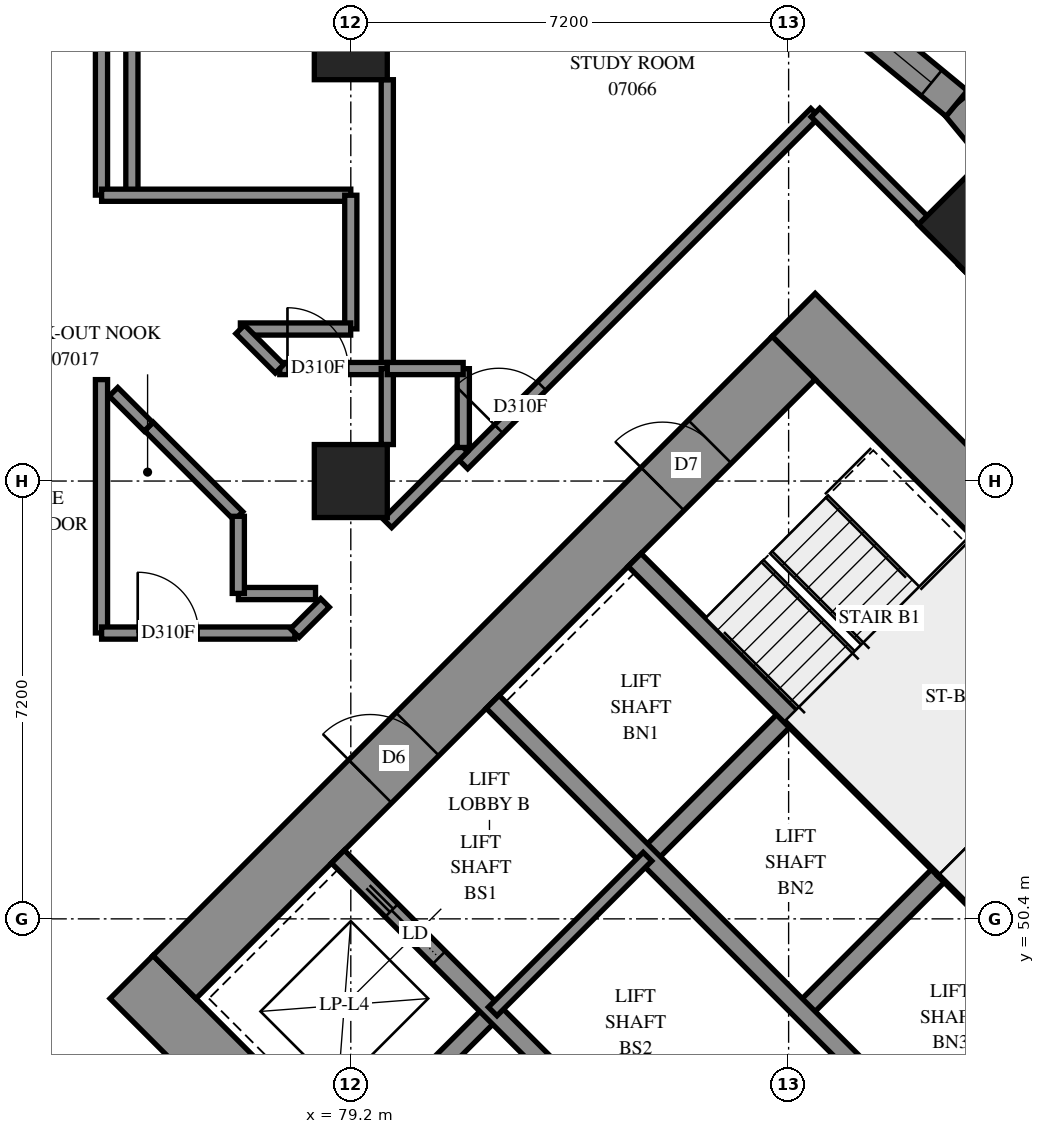
"""IFC4 building model, lengths in metres.
Left out: names, types, materials, properties, quantities, classifications, styles, units other than length and angle.
Written with IfcOpenShell. Run it as: python <this file> out.ifc"""

import sys

from ifc_helpers import new_model, si_unit, direction, frame, frame_2d, origin, origin_2d, place, context, subcontext, project, spatial, polyline, rectangle, outline, extrude, element, fill, save


model = new_model("IFC4")
c1 = context("Model", 3, precision=1e-05, world=origin(), true_north=direction((0.0, 1.0)))
c2 = subcontext(c1, "Body", "Model", "MODEL_VIEW")
j1 = project(units=[si_unit("LENGTHUNIT", "METRE"), si_unit("PLANEANGLEUNIT", "RADIAN")], contexts=[c1])
p1 = place(None, origin())
s1 = spatial("IfcSite", under=j1, at=p1, CompositionType="ELEMENT")
p2 = place(p1, origin())
s2 = spatial("IfcBuilding", under=s1, at=p2, CompositionType="ELEMENT")
p3 = place(p2, frame((0.0, 0.0, 30.4)))
s3 = spatial("IfcBuildingStorey", under=s2, at=p3, CompositionType="ELEMENT", Elevation=30.4)
for number, where, z_axis, x_axis in (
    (1, (79.2, 57.6, 0.0), (0.0, 0.0, 1.0), (1.0, 0.0, 0.0)),
    (2, (79.2, 64.8, 0.0), (0.0, 0.0, 1.0), (1.0, 0.0, 0.0)),
    (3, (89.382, 61.818, 0.0), (0.0, 0.0, 1.0), (0.707, -0.707, 0.0)),
):
    element("IfcColumn", number, at=place(p3, frame(where, z_axis=z_axis, x_axis=x_axis)), inside=s3, PredefinedType="COLUMN", context=c2, shape_type="SweptSolid", body=[
        extrude(rectangle(XDim=1.2, YDim=1.2, at=origin_2d()), origin(), (0.0, 0.0, 1.0), 3.1),
    ])
p4 = place(p3, frame((75.594, 49.443, -0.3), z_axis=(0.0, 0.0, 1.0), x_axis=(0.7071037324, -0.70710983, 0.0)))
e4 = element("IfcWall", 4, at=p4, inside=s3, PredefinedType="SHEAR", context=c2, shape_type="SweptSolid", body=[
    extrude(rectangle(XDim=16.4, YDim=1.0, at=frame_2d((8.2, 0.0))), origin(), (0.0, 0.0, 1.0), 2.7),
])
p5 = place(p3, frame((86.483, 60.333, -0.3), z_axis=(0.0, 0.0, 1.0), x_axis=(0.70710983, -0.7071037324, 0.0)))
e5 = element("IfcWall", 5, at=p5, inside=s3, PredefinedType="SHEAR", context=c2, shape_type="SweptSolid", body=[
    extrude(rectangle(XDim=16.4, YDim=1.0, at=frame_2d((8.2, 0.0))), origin(), (0.0, 0.0, 1.0), 2.7),
])
p6 = place(p5, frame((11.0, 0.0, 0.3)))
e6 = element("IfcOpeningElement", 6, at=p6, cuts=e5, PredefinedType="OPENING", context=c2, shape_type="SweptSolid", body=[
    extrude(rectangle(XDim=0.8, YDim=2.1, at=frame_2d((0.4, 1.05))), frame((0.0, 0.51, 0.0), z_axis=(0.0, -1.0, 0.0), x_axis=(1.0, 0.0, 0.0)), (0.0, 0.0, 1.0), 1.02),
])
p7 = place(p3, frame((76.301, 49.443, -0.3), z_axis=(0.0, 0.0, 1.0), x_axis=(0.7071067812, 0.7071067812, 0.0)))
e7 = element("IfcWall", 7, at=p7, inside=s3, PredefinedType="SHEAR", context=c2, shape_type="SweptSolid", body=[
    extrude(rectangle(XDim=14.4, YDim=1.0, at=frame_2d((7.2, 0.0))), origin(), (0.0, 0.0, 1.0), 2.7),
])
p8 = place(p7, frame((4.55, 0.0, 0.3)))
e8 = element("IfcOpeningElement", 8, at=p8, cuts=e7, PredefinedType="OPENING", context=c2, shape_type="SweptSolid", body=[
    extrude(rectangle(XDim=1.1, YDim=2.1, at=frame_2d((0.55, 1.05))), frame((0.0, 0.51, 0.0), z_axis=(0.0, -1.0, 0.0), x_axis=(1.0, 0.0, 0.0)), (0.0, 0.0, 1.0), 1.02),
])
p9 = place(p7, frame((11.35, 0.0, 0.3)))
e9 = element("IfcOpeningElement", 9, at=p9, cuts=e7, PredefinedType="OPENING", context=c2, shape_type="SweptSolid", body=[
    extrude(rectangle(XDim=1.1, YDim=2.1, at=frame_2d((0.55, 1.05))), frame((0.0, 0.51, 0.0), z_axis=(0.0, -1.0, 0.0), x_axis=(1.0, 0.0, 0.0)), (0.0, 0.0, 1.0), 1.02),
])
p10 = place(p3, frame((87.19, 38.554, -0.3), z_axis=(0.0, 0.0, 1.0), x_axis=(0.707103309, 0.7071102534, 0.0)))
e10 = element("IfcWall", 10, at=p10, inside=s3, PredefinedType="SHEAR", context=c2, shape_type="SweptSolid", body=[
    extrude(rectangle(XDim=14.4, YDim=1.0, at=frame_2d((7.2, 0.0))), origin(), (0.0, 0.0, 1.0), 2.7),
])
p11 = place(p10, frame((4.55, 0.0, 0.3)))
e11 = element("IfcOpeningElement", 11, at=p11, cuts=e10, PredefinedType="OPENING", context=c2, shape_type="SweptSolid", body=[
    extrude(rectangle(XDim=1.1, YDim=2.1, at=frame_2d((0.55, 1.05))), frame((0.0, 0.51, 0.0), z_axis=(0.0, -1.0, 0.0), x_axis=(1.0, 0.0, 0.0)), (0.0, 0.0, 1.0), 1.02),
])
p12 = place(p10, frame((11.35, 0.0, 0.3)))
e12 = element("IfcOpeningElement", 12, at=p12, cuts=e10, PredefinedType="OPENING", context=c2, shape_type="SweptSolid", body=[
    extrude(rectangle(XDim=1.1, YDim=2.1, at=frame_2d((0.55, 1.05))), frame((0.0, 0.51, 0.0), z_axis=(0.0, -1.0, 0.0), x_axis=(1.0, 0.0, 0.0)), (0.0, 0.0, 1.0), 1.02),
])
for number, where, z_axis, x_axis in (
    (13, (79.2, 46.544, 0.0), (0.0, 0.0, 1.0), (0.707, 0.707, 0.0)),
    (14, (84.079, 51.423, 0.0), (0.0, 0.0, 1.0), (0.707, 0.707, 0.0)),
):
    element("IfcWall", number, at=place(p3, frame(where, z_axis=z_axis, x_axis=x_axis)), inside=s3, PredefinedType="SOLIDWALL", context=c2, shape_type="SweptSolid", body=[
        extrude(rectangle(XDim=3.3, YDim=0.3, at=frame_2d((1.65, 0.0))), origin(), (0.0, 0.0, 1.0), 3.1),
    ])
for number, where, z_axis, x_axis in (
    (15, (86.625, 48.878, 0.0), (0.0, 0.0, 1.0), (0.707, 0.707, 0.0)),
    (16, (89.17, 46.332, 0.0), (0.0, 0.0, 1.0), (0.707, 0.707, 0.0)),
):
    element("IfcWall", number, at=place(p3, frame(where, z_axis=z_axis, x_axis=x_axis)), inside=s3, PredefinedType="SOLIDWALL", context=c2, shape_type="SweptSolid", body=[
        extrude(rectangle(XDim=3.3, YDim=0.3, at=frame_2d((1.65, 0.0))), origin(), (0.0, 0.0, 1.0), 3.1),
    ])
p13 = place(p3, frame((78.988, 51.423, 0.0), z_axis=(0.0, 0.0, 1.0), x_axis=(0.7071067812, -0.7071067812, 0.0)))
e17 = element("IfcWall", 17, at=p13, inside=s3, PredefinedType="SOLIDWALL", context=c2, shape_type="SweptSolid", body=[
    extrude(rectangle(XDim=14.4, YDim=0.3, at=frame_2d((7.2, 0.0))), origin(), (0.0, 0.0, 1.0), 3.1),
])
p14 = place(p13, frame((1.25, 0.0, 0.0)))
e18 = element("IfcOpeningElement", 18, at=p14, cuts=e17, PredefinedType="OPENING", context=c2, shape_type="SweptSolid", body=[
    extrude(rectangle(XDim=1.1, YDim=2.1, at=frame_2d((0.55, 1.05))), frame((0.0, 0.16, 0.0), z_axis=(0.0, -1.0, 0.0), x_axis=(1.0, 0.0, 0.0)), (0.0, 0.0, 1.0), 0.32),
])
p15 = place(p13, frame((4.85, 0.0, 0.0)))
e19 = element("IfcOpeningElement", 19, at=p15, cuts=e17, PredefinedType="OPENING", context=c2, shape_type="SweptSolid", body=[
    extrude(rectangle(XDim=1.1, YDim=2.1, at=frame_2d((0.55, 1.05))), frame((0.0, 0.16, 0.0), z_axis=(0.0, -1.0, 0.0), x_axis=(1.0, 0.0, 0.0)), (0.0, 0.0, 1.0), 0.32),
])
p16 = place(p13, frame((8.45, 0.0, 0.0)))
e20 = element("IfcOpeningElement", 20, at=p16, cuts=e17, PredefinedType="OPENING", context=c2, shape_type="SweptSolid", body=[
    extrude(rectangle(XDim=1.1, YDim=2.1, at=frame_2d((0.55, 1.05))), frame((0.0, 0.16, 0.0), z_axis=(0.0, -1.0, 0.0), x_axis=(1.0, 0.0, 0.0)), (0.0, 0.0, 1.0), 0.32),
])
p17 = place(p13, frame((12.05, 0.0, 0.0)))
e21 = element("IfcOpeningElement", 21, at=p17, cuts=e17, PredefinedType="OPENING", context=c2, shape_type="SweptSolid", body=[
    extrude(rectangle(XDim=1.1, YDim=2.1, at=frame_2d((0.55, 1.05))), frame((0.0, 0.16, 0.0), z_axis=(0.0, -1.0, 0.0), x_axis=(1.0, 0.0, 0.0)), (0.0, 0.0, 1.0), 0.32),
])
p18 = place(p3, frame((81.534, 53.969, 0.0), z_axis=(0.0, 0.0, 1.0), x_axis=(0.707103309, -0.7071102534, 0.0)))
e22 = element("IfcWall", 22, at=p18, inside=s3, PredefinedType="SOLIDWALL", context=c2, shape_type="SweptSolid", body=[
    extrude(rectangle(XDim=14.4, YDim=0.3, at=frame_2d((7.2, 0.0))), origin(), (0.0, 0.0, 1.0), 3.1),
])
p19 = place(p18, frame((12.05, 0.0, 0.0)))
e23 = element("IfcOpeningElement", 23, at=p19, cuts=e22, PredefinedType="OPENING", context=c2, shape_type="SweptSolid", body=[
    extrude(rectangle(XDim=1.1, YDim=2.1, at=frame_2d((0.55, 1.05))), frame((0.0, 0.16, 0.0), z_axis=(0.0, -1.0, 0.0), x_axis=(1.0, 0.0, 0.0)), (0.0, 0.0, 1.0), 0.32),
])
for number, where, z_axis, x_axis in (
    (24, (83.867, 56.302, 0.0), (0.0, 0.0, 1.0), (0.707, -0.707, 0.0)),
    (25, (88.958, 51.211, 0.0), (0.0, 0.0, 1.0), (0.707, -0.707, 0.0)),
):
    element("IfcWall", number, at=place(p3, frame(where, z_axis=z_axis, x_axis=x_axis)), inside=s3, PredefinedType="SOLIDWALL", context=c2, shape_type="SweptSolid", body=[
        extrude(rectangle(XDim=7.2, YDim=0.3, at=frame_2d((3.6, 0.0))), origin(), (0.0, 0.0, 1.0), 3.1),
    ])
p20 = place(p3, frame((88.958, 51.211, 0.0), z_axis=(0.0, 0.0, 1.0), x_axis=(0.7071067812, 0.7071067812, 0.0)))
e26 = element("IfcWall", 26, at=p20, inside=s3, PredefinedType="SOLIDWALL", context=c2, shape_type="SweptSolid", body=[
    extrude(rectangle(XDim=4.2, YDim=0.3, at=frame_2d((2.1, 0.0))), origin(), (0.0, 0.0, 1.0), 3.1),
])
p21 = place(p3, frame((91.357, 61.15, 0.0), z_axis=(0.0, 0.0, 1.0), x_axis=(-0.636139456, 0.7715741005, 0.0)))
e27 = element("IfcWall", 27, at=p21, inside=s3, PredefinedType="SOLIDWALL", context=c2, shape_type="SweptSolid", body=[
    extrude(outline(polyline([(0.026, -0.275), (3.472, -0.275), (3.42, 0.275), (-0.026, 0.275), (0.026, -0.275)])), origin(), (0.0, 0.0, 1.0), 3.1),
])
p22 = place(p21, frame((0.439, 0.0, 0.5)))
e28 = element("IfcOpeningElement", 28, at=p22, cuts=e27, PredefinedType="OPENING", context=c2, shape_type="SweptSolid", body=[
    extrude(rectangle(XDim=1.2, YDim=2.45, at=frame_2d((0.6, 1.225))), frame((0.0, 0.285, 0.0), z_axis=(0.0, -1.0, 0.0), x_axis=(1.0, 0.0, 0.0)), (0.0, 0.0, 1.0), 0.57),
])
p23 = place(p3, frame((89.165, 63.809, 0.0), z_axis=(0.0, 0.0, 1.0), x_axis=(-0.7715741005, 0.636139456, 0.0)))
e29 = element("IfcWall", 29, at=p23, inside=s3, PredefinedType="SOLIDWALL", context=c2, shape_type="SweptSolid", body=[
    extrude(outline(polyline([(-0.026, -0.275), (3.42, -0.275), (3.472, 0.275), (0.026, 0.275), (-0.026, -0.275)])), origin(), (0.0, 0.0, 1.0), 3.1),
])
p24 = place(p23, frame((0.537, 0.0, 0.5)))
e30 = element("IfcOpeningElement", 30, at=p24, cuts=e29, PredefinedType="OPENING", context=c2, shape_type="SweptSolid", body=[
    extrude(rectangle(XDim=1.2, YDim=2.45, at=frame_2d((0.6, 1.225))), frame((0.0, 0.285, 0.0), z_axis=(0.0, -1.0, 0.0), x_axis=(1.0, 0.0, 0.0)), (0.0, 0.0, 1.0), 0.57),
])
p25 = place(p3, frame((81.534, 48.878, 0.0), z_axis=(0.0, 0.0, 1.0), x_axis=(0.707092892, 0.7071206701, 0.0)))
e31 = element("IfcWall", 31, at=p25, inside=s3, PredefinedType="PARTITIONING", context=c2, shape_type="SweptSolid", body=[
    extrude(rectangle(XDim=3.6, YDim=0.2, at=frame_2d((1.8, 0.0))), origin(), (0.0, 0.0, 1.0), 3.1),
])
p26 = place(p3, frame((75.6, 62.3, 0.0), z_axis=(0.0, 0.0, 1.0), x_axis=(0.0, 1.0, 0.0)))
e32 = element("IfcWall", 32, at=p26, inside=s3, PredefinedType="PARTITIONING", context=c2, shape_type="SweptSolid", body=[
    extrude(rectangle(XDim=10.408, YDim=0.2, at=frame_2d((5.204, 0.0))), origin(), (0.0, 0.0, 1.0), 3.1),
])
p27 = place(p3, frame((81.052, 57.873, 0.0), z_axis=(0.0, 0.0, 1.0), x_axis=(0.7071067812, 0.7071067812, 0.0)))
e33 = element("IfcWall", 33, at=p27, inside=s3, PredefinedType="PARTITIONING", context=c2, shape_type="SweptSolid", body=[
    extrude(rectangle(XDim=8.18, YDim=0.2, at=frame_2d((4.09, 0.0))), origin(), (0.0, 0.0, 1.0), 3.1),
])
p28 = place(p27, frame((0.823, 0.0, 0.0)))
e34 = element("IfcOpeningElement", 34, at=p28, cuts=e33, PredefinedType="OPENING", context=c2, shape_type="SweptSolid", body=[
    extrude(rectangle(XDim=1.0, YDim=2.1, at=frame_2d((0.5, 1.05))), frame((0.0, 0.11, 0.0), z_axis=(0.0, -1.0, 0.0), x_axis=(1.0, 0.0, 0.0)), (0.0, 0.0, 1.0), 0.22),
])
p29 = place(p3, frame((89.271, 61.215, 0.0), z_axis=(0.0, 0.0, 1.0), x_axis=(0.7071067812, -0.7071067812, 0.0)))
e35 = element("IfcWall", 35, at=p29, inside=s3, PredefinedType="PARTITIONING", context=c2, shape_type="SweptSolid", body=[
    extrude(rectangle(XDim=6.505, YDim=0.2, at=frame_2d((3.253, 0.0))), origin(), (0.0, 0.0, 1.0), 3.1),
])
p30 = place(p3, frame((75.1, 62.302, 0.0), z_axis=(0.0, 0.0, 1.0), x_axis=(0.0, 1.0, 0.0)))
e36 = element("IfcWall", 36, at=p30, inside=s3, PredefinedType="PARTITIONING", context=c2, shape_type="SweptSolid", body=[
    extrude(rectangle(XDim=5.598, YDim=0.2, at=frame_2d((2.799, 0.0))), origin(), (0.0, 0.0, 1.0), 3.1),
])
p31 = place(p3, frame((79.8, 59.45, 0.0), z_axis=(0.0, 0.0, 1.0), x_axis=(0.0, 1.0, 0.0)))
e37 = element("IfcWall", 37, at=p31, inside=s3, PredefinedType="PARTITIONING", context=c2, shape_type="SweptSolid", body=[
    extrude(rectangle(XDim=4.75, YDim=0.2, at=frame_2d((2.375, 0.0))), origin(), (0.0, 0.0, 1.0), 3.1),
])
p32 = place(p3, frame((75.1, 55.102, 0.0), z_axis=(0.0, 0.0, 1.0), x_axis=(0.0, 1.0, 0.0)))
e38 = element("IfcWall", 38, at=p32, inside=s3, PredefinedType="PARTITIONING", context=c2, shape_type="SweptSolid", body=[
    extrude(rectangle(XDim=4.166, YDim=0.2, at=frame_2d((2.083, 0.0))), origin(), (0.0, 0.0, 1.0), 3.1),
])
p33 = place(p3, frame((75.102, 62.3, 0.0), z_axis=(0.0, 0.0, 1.0), x_axis=(1.0, 0.0, 0.0)))
e39 = element("IfcWall", 39, at=p33, inside=s3, PredefinedType="PARTITIONING", context=c2, shape_type="SweptSolid", body=[
    extrude(rectangle(XDim=4.098, YDim=0.2, at=frame_2d((2.049, 0.0))), origin(), (0.0, 0.0, 1.0), 3.1),
])
p34 = place(p3, frame((75.102, 55.1, 0.0), z_axis=(0.0, 0.0, 1.0), x_axis=(1.0, 0.0, 0.0)))
e40 = element("IfcWall", 40, at=p34, inside=s3, PredefinedType="PARTITIONING", context=c2, shape_type="SweptSolid", body=[
    extrude(rectangle(XDim=3.178, YDim=0.2, at=frame_2d((1.589, 0.0))), origin(), (0.0, 0.0, 1.0), 3.1),
])
p35 = place(p34, frame((0.594, 0.0, 0.0)))
e41 = element("IfcOpeningElement", 41, at=p35, cuts=e40, PredefinedType="OPENING", context=c2, shape_type="SweptSolid", body=[
    extrude(rectangle(XDim=1.0, YDim=2.1, at=frame_2d((0.5, 1.05))), frame((0.0, 0.11, 0.0), z_axis=(0.0, -1.0, 0.0), x_axis=(1.0, 0.0, 0.0)), (0.0, 0.0, 1.0), 0.22),
])
p36 = place(p3, frame((86.841, 63.659, 0.0), z_axis=(0.0, 0.0, 1.0), x_axis=(0.7067795096, -0.7074339014, 0.0)))
e42 = element("IfcWall", 42, at=p36, inside=s3, PredefinedType="PARTITIONING", context=c2, shape_type="SweptSolid", body=[
    extrude(rectangle(XDim=2.751, YDim=0.2, at=frame_2d((1.375, 0.0))), origin(), (0.0, 0.0, 1.0), 3.1),
])
p37 = place(p3, frame((79.2, 60.102, 0.0), z_axis=(0.0, 0.0, 1.0), x_axis=(0.0, 1.0, 0.0)))
e43 = element("IfcWall", 43, at=p37, inside=s3, PredefinedType="PARTITIONING", context=c2, shape_type="SweptSolid", body=[
    extrude(rectangle(XDim=2.198, YDim=0.2, at=frame_2d((1.099, 0.0))), origin(), (0.0, 0.0, 1.0), 3.1),
])
p38 = place(p3, frame((75.879, 58.497, 0.0), z_axis=(0.0, 0.0, 1.0), x_axis=(0.7075866635, -0.706626573, 0.0)))
e44 = element("IfcWall", 44, at=p38, inside=s3, PredefinedType="PARTITIONING", context=c2, shape_type="SweptSolid", body=[
    extrude(rectangle(XDim=2.083, YDim=0.2, at=frame_2d((1.042, 0.0))), origin(), (0.0, 0.0, 1.0), 3.1),
])
p39 = place(p3, frame((77.384, 60.1, 0.0), z_axis=(0.0, 0.0, 1.0), x_axis=(1.0, 0.0, 0.0)))
e45 = element("IfcWall", 45, at=p39, inside=s3, PredefinedType="PARTITIONING", context=c2, shape_type="SweptSolid", body=[
    extrude(rectangle(XDim=1.814, YDim=0.2, at=frame_2d((0.907, 0.0))), origin(), (0.0, 0.0, 1.0), 3.1),
])
p40 = place(p3, frame((78.032, 59.45, 0.0), z_axis=(0.0, 0.0, 1.0), x_axis=(1.0, 0.0, 0.0)))
e46 = element("IfcWall", 46, at=p40, inside=s3, PredefinedType="PARTITIONING", context=c2, shape_type="SweptSolid", body=[
    extrude(rectangle(XDim=1.768, YDim=0.2, at=frame_2d((0.884, 0.0))), origin(), (0.0, 0.0, 1.0), 3.1),
])
p41 = place(p40, frame((0.126, 0.0, 0.0)))
e47 = element("IfcOpeningElement", 47, at=p41, cuts=e46, PredefinedType="OPENING", context=c2, shape_type="SweptSolid", body=[
    extrude(rectangle(XDim=1.0, YDim=2.1, at=frame_2d((0.5, 1.05))), frame((0.0, 0.11, 0.0), z_axis=(0.0, -1.0, 0.0), x_axis=(1.0, 0.0, 0.0)), (0.0, 0.0, 1.0), 0.22),
])
p42 = place(p3, frame((79.801, 56.905, 0.0), z_axis=(0.0, 0.0, 1.0), x_axis=(0.7071067812, 0.7071067812, 0.0)))
e48 = element("IfcWall", 48, at=p42, inside=s3, PredefinedType="PARTITIONING", context=c2, shape_type="SweptSolid", body=[
    extrude(rectangle(XDim=1.765, YDim=0.2, at=frame_2d((0.882, 0.0))), origin(), (0.0, 0.0, 1.0), 3.1),
])
p43 = place(p3, frame((81.05, 58.152, 0.0), z_axis=(0.0, 0.0, 1.0), x_axis=(0.0, 1.0, 0.0)))
e49 = element("IfcWall", 49, at=p43, inside=s3, PredefinedType="PARTITIONING", context=c2, shape_type="SweptSolid", body=[
    extrude(rectangle(XDim=1.296, YDim=0.2, at=frame_2d((0.648, 0.0))), origin(), (0.0, 0.0, 1.0), 3.1),
])
for number, where, z_axis, x_axis in (
    (50, (77.352, 55.75, 0.0), (0.0, 0.0, 1.0), (1.0, 0.0, 0.0)),
    (51, (77.35, 55.752, 0.0), (0.0, 0.0, 1.0), (0.0, 1.0, 0.0)),
):
    element("IfcWall", number, at=place(p3, frame(where, z_axis=z_axis, x_axis=x_axis)), inside=s3, PredefinedType="PARTITIONING", context=c2, shape_type="SweptSolid", body=[
        extrude(rectangle(XDim=1.268, YDim=0.2, at=frame_2d((0.634, 0.0))), origin(), (0.0, 0.0, 1.0), 3.1),
    ])
p44 = place(p3, frame((79.8, 58.2, 0.0), z_axis=(0.0, 0.0, 1.0), x_axis=(0.0, 1.0, 0.0)))
e52 = element("IfcWall", 52, at=p44, inside=s3, PredefinedType="PARTITIONING", context=c2, shape_type="SweptSolid", body=[
    extrude(rectangle(XDim=1.25, YDim=0.2, at=frame_2d((0.625, 0.0))), origin(), (0.0, 0.0, 1.0), 3.1),
])
p45 = place(p3, frame((79.8, 59.45, 0.0), z_axis=(0.0, 0.0, 1.0), x_axis=(1.0, 0.0, 0.0)))
e53 = element("IfcWall", 53, at=p45, inside=s3, PredefinedType="PARTITIONING", context=c2, shape_type="SweptSolid", body=[
    extrude(rectangle(XDim=1.248, YDim=0.2, at=frame_2d((0.624, 0.0))), origin(), (0.0, 0.0, 1.0), 3.1),
])
p46 = place(p3, frame((77.381, 60.095, 0.0), z_axis=(0.0, 0.0, 1.0), x_axis=(0.7071067812, -0.7071067812, 0.0)))
e54 = element("IfcWall", 54, at=p46, inside=s3, PredefinedType="PARTITIONING", context=c2, shape_type="SweptSolid", body=[
    extrude(rectangle(XDim=0.916, YDim=0.2, at=frame_2d((0.458, 0.0))), origin(), (0.0, 0.0, 1.0), 3.1),
])
p47 = place(p3, frame((75.297, 59.067, 0.0), z_axis=(0.0, 0.0, 1.0), x_axis=(0.7071067812, -0.7071067812, 0.0)))
e55 = element("IfcWall", 55, at=p47, inside=s3, PredefinedType="PARTITIONING", context=c2, shape_type="SweptSolid", body=[
    extrude(rectangle(XDim=0.815, YDim=0.2, at=frame_2d((0.407, 0.0))), origin(), (0.0, 0.0, 1.0), 3.1),
])
p48 = place(p3, frame((78.279, 55.1, 0.0), z_axis=(0.0, 0.0, 1.0), x_axis=(0.7071067812, 0.7071067812, 0.0)))
e56 = element("IfcWall", 56, at=p48, inside=s3, PredefinedType="PARTITIONING", context=c2, shape_type="SweptSolid", body=[
    extrude(rectangle(XDim=0.701, YDim=0.2, at=frame_2d((0.351, 0.0))), origin(), (0.0, 0.0, 1.0), 3.1),
])
p49 = place(p24, origin())
e57 = element("IfcWindow", 57, at=p49, inside=s3, PartitioningType="SINGLE_PANEL", PredefinedType="WINDOW", context=c2, shape_type="SweptSolid", body=[
    extrude(rectangle(XDim=1.2, YDim=2.45, at=frame_2d((0.6, 1.225))), frame((0.0, 0.155, 0.0), z_axis=(0.0, -1.0, 0.0), x_axis=(1.0, 0.0, 0.0)), (0.0, 0.0, 1.0), 0.06),
])
fill(e30, e57)
p50 = place(p8, origin())
e58 = element("IfcDoor", 58, at=p50, inside=s3, OperationType="DOUBLE_DOOR_SINGLE_SWING", PredefinedType="DOOR", context=c2, shape_type="SweptSolid", body=[
    extrude(rectangle(XDim=1.1, YDim=2.1, at=frame_2d((0.55, 1.05))), frame((0.0, 0.025, 0.0), z_axis=(0.0, -1.0, 0.0), x_axis=(1.0, 0.0, 0.0)), (0.0, 0.0, 1.0), 0.05),
])
fill(e8, e58)
p51 = place(p9, origin())
e59 = element("IfcDoor", 59, at=p51, inside=s3, OperationType="SINGLE_SWING_LEFT", PredefinedType="DOOR", context=c2, shape_type="SweptSolid", body=[
    extrude(rectangle(XDim=1.1, YDim=2.1, at=frame_2d((0.55, 1.05))), frame((0.0, 0.025, 0.0), z_axis=(0.0, -1.0, 0.0), x_axis=(1.0, 0.0, 0.0)), (0.0, 0.0, 1.0), 0.05),
])
fill(e9, e59)
p52 = place(p14, origin())
e60 = element("IfcDoor", 60, at=p52, inside=s3, OperationType="SLIDING_TO_LEFT", PredefinedType="DOOR", context=c2, shape_type="SweptSolid", body=[
    extrude(rectangle(XDim=1.1, YDim=2.1, at=frame_2d((0.55, 1.05))), frame((0.0, 0.025, 0.0), z_axis=(0.0, -1.0, 0.0), x_axis=(1.0, 0.0, 0.0)), (0.0, 0.0, 1.0), 0.05),
])
fill(e18, e60)
p53 = place(p35, origin())
e61 = element("IfcDoor", 61, at=p53, inside=s3, OperationType="SINGLE_SWING_LEFT", PredefinedType="DOOR", context=c2, shape_type="SweptSolid", body=[
    extrude(rectangle(XDim=1.0, YDim=2.1, at=frame_2d((0.5, 1.05))), frame((0.0, 0.025, 0.0), z_axis=(0.0, -1.0, 0.0), x_axis=(1.0, 0.0, 0.0)), (0.0, 0.0, 1.0), 0.05),
])
fill(e41, e61)
p54 = place(p41, origin())
e62 = element("IfcDoor", 62, at=p54, inside=s3, OperationType="SINGLE_SWING_LEFT", PredefinedType="DOOR", context=c2, shape_type="SweptSolid", body=[
    extrude(rectangle(XDim=1.0, YDim=2.1, at=frame_2d((0.5, 1.05))), frame((0.0, 0.025, 0.0), z_axis=(0.0, -1.0, 0.0), x_axis=(1.0, 0.0, 0.0)), (0.0, 0.0, 1.0), 0.05),
])
fill(e47, e62)
p55 = place(p28, origin())
e63 = element("IfcDoor", 63, at=p55, inside=s3, OperationType="SINGLE_SWING_RIGHT", PredefinedType="DOOR", context=c2, shape_type="SweptSolid", body=[
    extrude(rectangle(XDim=1.0, YDim=2.1, at=frame_2d((0.5, 1.05))), frame((0.0, 0.025, 0.0), z_axis=(0.0, -1.0, 0.0), x_axis=(1.0, 0.0, 0.0)), (0.0, 0.0, 1.0), 0.05),
])
fill(e34, e63)
save(model, sys.argv[1])
